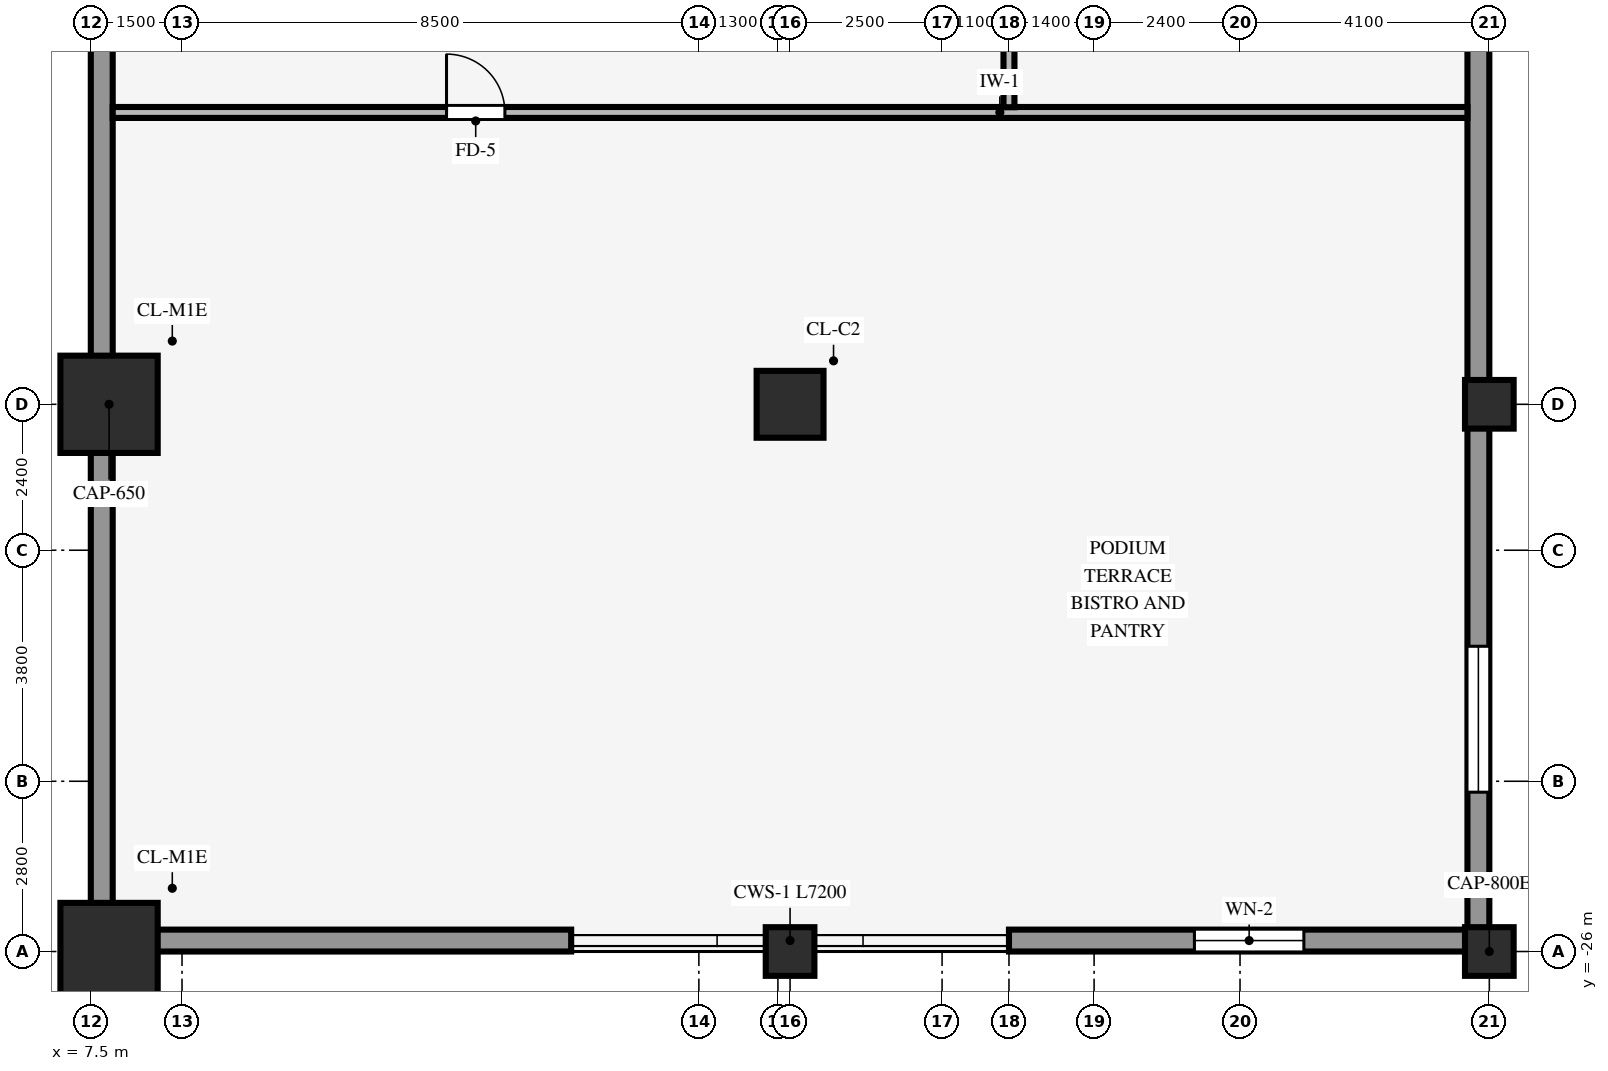
"""IFC4 building model, lengths in metres.
Left out: names, types, materials, properties, quantities, classifications, styles, units other than length and angle.
Written with IfcOpenShell. Run it as: python <this file> out.ifc"""

import sys

from ifc_helpers import new_model, si_unit, direction, frame, frame_2d, origin, origin_2d, place, context, subcontext, project, spatial, rectangle, hollow_rectangle, extrude, source, transform, mapped, element, fill, save


model = new_model("IFC4")
c1 = context("Model", 3, precision=1e-05, world=origin(), true_north=direction((0.0, 1.0)))
c2 = subcontext(c1, "Body", "Model", "MODEL_VIEW")
j1 = project(units=[si_unit("LENGTHUNIT", "METRE"), si_unit("PLANEANGLEUNIT", "RADIAN")], contexts=[c1])
p1 = place(None, origin())
s1 = spatial("IfcSite", under=j1, at=p1, CompositionType="ELEMENT")
p2 = place(p1, origin())
s2 = spatial("IfcBuilding", under=s1, at=p2, CompositionType="ELEMENT")
p3 = place(p2, frame((0.0, 0.0, 13.8)))
s3 = spatial("IfcBuildingStorey", under=s2, at=p3, CompositionType="ELEMENT", Elevation=13.8)
for number, where, z_axis, x_axis in (
    (1, (7.8, -26.0, 0.0), (0.0, 0.0, 1.0), (1.0, 0.0, 0.0)),
    (2, (7.8, -17.0, 0.0), (0.0, 0.0, 1.0), (1.0, 0.0, 0.0)),
):
    element("IfcColumn", number, at=place(p3, frame(where, z_axis=z_axis, x_axis=x_axis)), inside=s3, PredefinedType="COLUMN", context=c2, shape_type="SweptSolid", body=[
        extrude(rectangle(XDim=1.6, YDim=1.6, at=origin_2d()), origin(), (0.0, 0.0, 1.0), 4.2),
    ])
p4 = place(p3, frame((19.0, -26.0, 0.0), z_axis=(0.0, 0.0, 1.0), x_axis=(1.0, 0.0, 0.0)))
e3 = element("IfcColumn", 3, at=p4, inside=s3, PredefinedType="COLUMN", context=c2, shape_type="SweptSolid", body=[
    extrude(hollow_rectangle(XDim=0.8, YDim=0.8, WallThickness=0.055, InnerFilletRadius=0.055, OuterFilletRadius=0.11, at=origin_2d()), origin(), (0.0, 0.0, 1.0), 4.2),
])
p5 = place(p3, frame((19.0, -17.0, 0.0), z_axis=(0.0, 0.0, 1.0), x_axis=(1.0, 0.0, 0.0)))
e4 = element("IfcColumn", 4, at=p5, inside=s3, PredefinedType="COLUMN", context=c2, shape_type="SweptSolid", body=[
    extrude(rectangle(XDim=1.1, YDim=1.1, at=origin_2d()), origin(), (0.0, 0.0, 1.0), 4.2),
])
for number, where, z_axis, x_axis in (
    (5, (30.5, -26.0, 0.0), (0.0, 0.0, 1.0), (1.0, 0.0, 0.0)),
    (6, (30.5, -17.0, 0.0), (0.0, 0.0, 1.0), (1.0, 0.0, 0.0)),
):
    element("IfcColumn", number, at=place(p3, frame(where, z_axis=z_axis, x_axis=x_axis)), inside=s3, PredefinedType="COLUMN", context=c2, shape_type="SweptSolid", body=[
        extrude(hollow_rectangle(XDim=0.8, YDim=0.8, WallThickness=0.055, InnerFilletRadius=0.055, OuterFilletRadius=0.11, at=origin_2d()), origin(), (0.0, 0.0, 1.0), 4.2),
    ])
p6 = place(p3, frame((7.5, -25.82, 0.0), z_axis=(0.0, 0.0, 1.0), x_axis=(1.0, 0.0, 0.0)))
e7 = element("IfcWall", 7, at=p6, inside=s3, PredefinedType="STANDARD", context=c2, shape_type="SweptSolid", body=[
    extrude(rectangle(XDim=7.9, YDim=0.36, at=frame_2d((3.95, 0.0))), origin(), (0.0, 0.0, 1.0), 2.585),
])
p7 = place(p3, frame((22.6, -25.82, 0.0), z_axis=(0.0, 0.0, 1.0), x_axis=(1.0, 0.0, 0.0)))
e8 = element("IfcWall", 8, at=p7, inside=s3, PredefinedType="STANDARD", context=c2, shape_type="SweptSolid", body=[
    extrude(rectangle(XDim=7.9, YDim=0.36, at=frame_2d((3.95, 0.0))), origin(), (0.0, 0.0, 1.0), 3.535),
])
p8 = place(p7, frame((3.05, 0.0, 0.85)))
e9 = element("IfcOpeningElement", 9, at=p8, cuts=e8, PredefinedType="OPENING", context=c2, shape_type="SweptSolid", body=[
    extrude(rectangle(XDim=1.8, YDim=2.35, at=frame_2d((0.9, 1.175))), frame((0.0, 0.19, 0.0), z_axis=(0.0, -1.0, 0.0), x_axis=(1.0, 0.0, 0.0)), (0.0, 0.0, 1.0), 0.38),
])
p9 = place(p3, frame((30.32, -25.644, 0.0), z_axis=(0.0, 0.0, 1.0), x_axis=(0.0, 1.0, 0.0)))
e10 = element("IfcWall", 10, at=p9, inside=s3, PredefinedType="STANDARD", context=c2, shape_type="SweptSolid", body=[
    extrude(rectangle(XDim=51.288, YDim=0.36, at=frame_2d((25.644, 0.0))), origin(), (0.0, 0.0, 1.0), 3.535),
])
p10 = place(p9, frame((2.264, 0.0, 0.85)))
e11 = element("IfcOpeningElement", 11, at=p10, cuts=e10, PredefinedType="OPENING", context=c2, shape_type="SweptSolid", body=[
    extrude(rectangle(XDim=2.4, YDim=2.45, at=frame_2d((1.2, 1.225))), frame((0.0, 0.19, 0.0), z_axis=(0.0, -1.0, 0.0), x_axis=(1.0, 0.0, 0.0)), (0.0, 0.0, 1.0), 0.38),
])
p11 = place(p9, frame((17.051, 0.0, 0.85)))
e12 = element("IfcOpeningElement", 12, at=p11, cuts=e10, PredefinedType="OPENING", context=c2, shape_type="SweptSolid", body=[
    extrude(rectangle(XDim=2.4, YDim=2.45, at=frame_2d((1.2, 1.225))), frame((0.0, 0.19, 0.0), z_axis=(0.0, -1.0, 0.0), x_axis=(1.0, 0.0, 0.0)), (0.0, 0.0, 1.0), 0.38),
])
p12 = place(p9, frame((21.979, 0.0, 0.85)))
e13 = element("IfcOpeningElement", 13, at=p12, cuts=e10, PredefinedType="OPENING", context=c2, shape_type="SweptSolid", body=[
    extrude(rectangle(XDim=2.4, YDim=2.45, at=frame_2d((1.2, 1.225))), frame((0.0, 0.19, 0.0), z_axis=(0.0, -1.0, 0.0), x_axis=(1.0, 0.0, 0.0)), (0.0, 0.0, 1.0), 0.38),
])
p13 = place(p9, frame((26.908, 0.0, 0.85)))
e14 = element("IfcOpeningElement", 14, at=p13, cuts=e10, PredefinedType="OPENING", context=c2, shape_type="SweptSolid", body=[
    extrude(rectangle(XDim=2.4, YDim=2.45, at=frame_2d((1.2, 1.225))), frame((0.0, 0.19, 0.0), z_axis=(0.0, -1.0, 0.0), x_axis=(1.0, 0.0, 0.0)), (0.0, 0.0, 1.0), 0.38),
])
p14 = place(p9, frame((31.837, 0.0, 0.85)))
e15 = element("IfcOpeningElement", 15, at=p14, cuts=e10, PredefinedType="OPENING", context=c2, shape_type="SweptSolid", body=[
    extrude(rectangle(XDim=2.4, YDim=2.45, at=frame_2d((1.2, 1.225))), frame((0.0, 0.19, 0.0), z_axis=(0.0, -1.0, 0.0), x_axis=(1.0, 0.0, 0.0)), (0.0, 0.0, 1.0), 0.38),
])
p15 = place(p9, frame((46.624, 0.0, 0.85)))
e16 = element("IfcOpeningElement", 16, at=p15, cuts=e10, PredefinedType="OPENING", context=c2, shape_type="SweptSolid", body=[
    extrude(rectangle(XDim=2.4, YDim=2.45, at=frame_2d((1.2, 1.225))), frame((0.0, 0.19, 0.0), z_axis=(0.0, -1.0, 0.0), x_axis=(1.0, 0.0, 0.0)), (0.0, 0.0, 1.0), 0.38),
])
p16 = place(p3, frame((7.68, -25.644, 0.0), z_axis=(0.0, 0.0, 1.0), x_axis=(0.0, 1.0, 0.0)))
e17 = element("IfcWall", 17, at=p16, inside=s3, PredefinedType="STANDARD", context=c2, shape_type="SweptSolid", body=[
    extrude(rectangle(XDim=51.288, YDim=0.36, at=frame_2d((25.644, 0.0))), origin(), (0.0, 0.0, 1.0), 2.985),
])
p17 = place(p3, frame((7.86, -12.2, 0.0), z_axis=(0.0, 0.0, 1.0), x_axis=(1.0, 0.0, 0.0)))
e18 = element("IfcWall", 18, at=p17, inside=s3, PredefinedType="PARTITIONING", context=c2, shape_type="SweptSolid", body=[
    extrude(rectangle(XDim=22.28, YDim=0.18, at=frame_2d((11.14, 0.0))), origin(), (0.0, 0.0, 1.0), 4.19),
])
p18 = place(p17, frame((5.49, 0.0, 0.0)))
e19 = element("IfcOpeningElement", 19, at=p18, cuts=e18, PredefinedType="OPENING", context=c2, shape_type="SweptSolid", body=[
    extrude(rectangle(XDim=0.96, YDim=2.1, at=frame_2d((0.48, 1.05))), frame((0.0, 0.1, 0.0), z_axis=(0.0, -1.0, 0.0), x_axis=(1.0, 0.0, 0.0)), (0.0, 0.0, 1.0), 0.2),
])
p19 = place(p3, frame((22.6, -12.114, 0.0), z_axis=(0.0, 0.0, 1.0), x_axis=(0.0, 1.0, 0.0)))
e20 = element("IfcWall", 20, at=p19, inside=s3, PredefinedType="PARTITIONING", context=c2, shape_type="SweptSolid", body=[
    extrude(rectangle(XDim=37.919, YDim=0.18, at=frame_2d((18.959, 0.0))), origin(), (0.0, 0.0, 1.0), 4.19),
])
p20 = place(p19, frame((11.634, 0.0, 0.0)))
e21 = element("IfcOpeningElement", 21, at=p20, cuts=e20, PredefinedType="OPENING", context=c2, shape_type="SweptSolid", body=[
    extrude(rectangle(XDim=0.96, YDim=2.1, at=frame_2d((0.48, 1.05))), frame((0.0, 0.1, 0.0), z_axis=(0.0, -1.0, 0.0), x_axis=(1.0, 0.0, 0.0)), (0.0, 0.0, 1.0), 0.2),
])
p21 = place(p19, frame((29.534, 0.0, 0.0)))
e22 = element("IfcOpeningElement", 22, at=p21, cuts=e20, PredefinedType="OPENING", context=c2, shape_type="SweptSolid", body=[
    extrude(rectangle(XDim=0.96, YDim=2.1, at=frame_2d((0.48, 1.05))), frame((0.0, 0.1, 0.0), z_axis=(0.0, -1.0, 0.0), x_axis=(1.0, 0.0, 0.0)), (0.0, 0.0, 1.0), 0.2),
])
m1 = source(origin(), c2, "Body", "SweptSolid", [
    extrude(rectangle(XDim=1.8, YDim=2.35, at=frame_2d((0.9, 1.175))), frame((0.0, 0.03, 0.0), z_axis=(0.0, -1.0, 0.0), x_axis=(1.0, 0.0, 0.0)), (0.0, 0.0, 1.0), 0.06),
])
p22 = place(p8, origin())
e23 = element("IfcWindow", 23, at=p22, inside=s3, PartitioningType="SINGLE_PANEL", PredefinedType="WINDOW", context=c2, shape_type="MappedRepresentation", body=[
    mapped(m1, transform((0.0, 0.0, 0.0), scale=1.0)),
])
fill(e9, e23)
m2 = source(origin(), c2, "Body", "SweptSolid", [
    extrude(rectangle(XDim=2.4, YDim=2.45, at=frame_2d((1.2, 1.225))), frame((0.0, 0.03, 0.0), z_axis=(0.0, -1.0, 0.0), x_axis=(1.0, 0.0, 0.0)), (0.0, 0.0, 1.0), 0.06),
])
p23 = place(p10, origin())
e24 = element("IfcWindow", 24, at=p23, inside=s3, PartitioningType="SINGLE_PANEL", PredefinedType="WINDOW", context=c2, shape_type="MappedRepresentation", body=[
    mapped(m2, transform((0.0, 0.0, 0.0), scale=1.0)),
])
fill(e11, e24)
m3 = source(origin(), c2, "Body", "SweptSolid", [
    extrude(rectangle(XDim=0.96, YDim=2.1, at=frame_2d((0.48, 1.05))), frame((0.0, 0.025, 0.0), z_axis=(0.0, -1.0, 0.0), x_axis=(1.0, 0.0, 0.0)), (0.0, 0.0, 1.0), 0.05),
])
p24 = place(p18, origin())
e25 = element("IfcDoor", 25, at=p24, inside=s3, OperationType="SINGLE_SWING_LEFT", PredefinedType="DOOR", context=c2, shape_type="MappedRepresentation", body=[
    mapped(m3, transform((0.0, 0.0, 0.0), scale=1.0)),
])
fill(e19, e25)
save(model, sys.argv[1])
